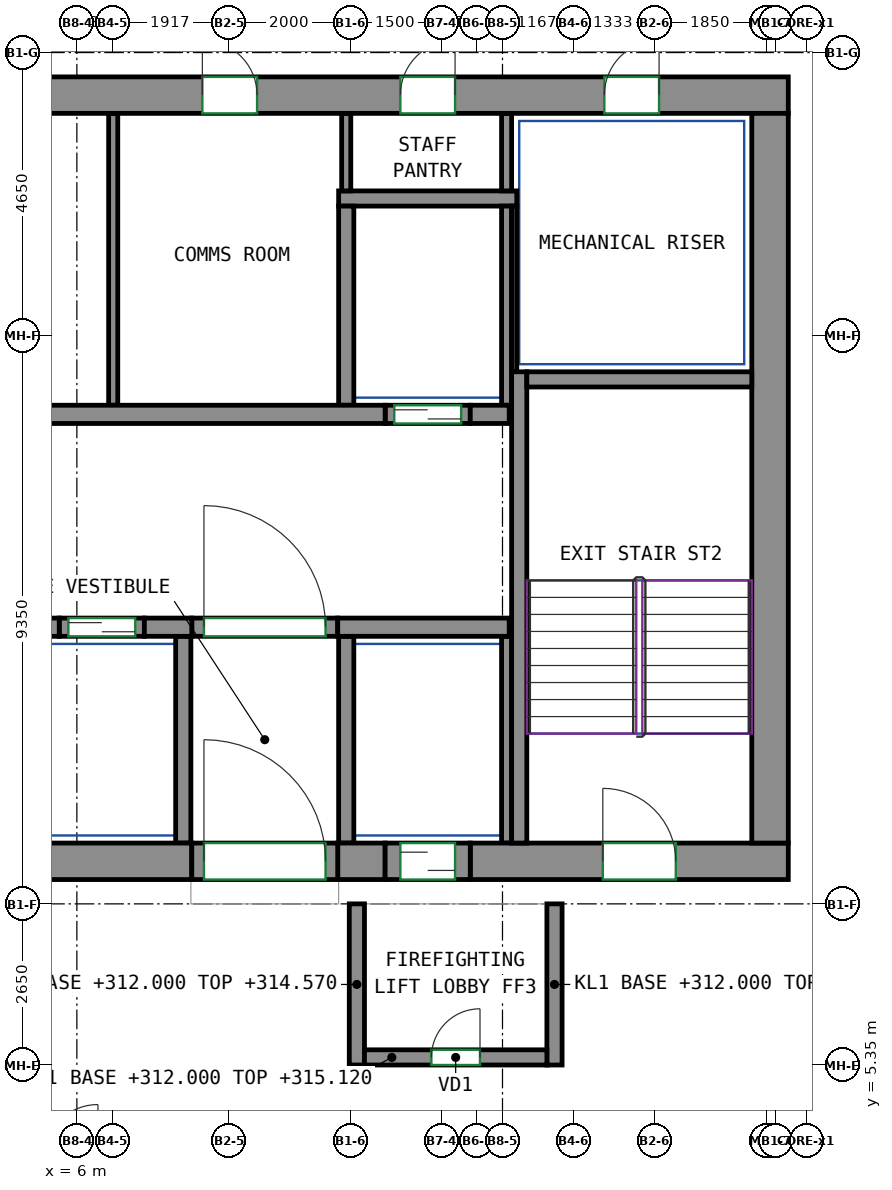
"""IFC4 building model, lengths in metres.
Left out: names, types, materials, properties, quantities, classifications, styles, units other than length and angle.
Written with IfcOpenShell. Run it as: python <this file> out.ifc"""

import sys

from ifc_helpers import new_model, si_unit, direction, frame, frame_2d, origin, place, context, subcontext, project, spatial, rectangle, extrude, source, transform, mapped, element, fill, save


model = new_model("IFC4")
c1 = context("Model", 3, precision=1e-05, world=origin(), true_north=direction((0.0, 1.0)))
c2 = subcontext(c1, "Body", "Model", "MODEL_VIEW")
j1 = project(units=[si_unit("LENGTHUNIT", "METRE"), si_unit("PLANEANGLEUNIT", "RADIAN")], contexts=[c1])
p1 = place(None, origin())
s1 = spatial("IfcSite", under=j1, at=p1, CompositionType="ELEMENT")
p2 = place(p1, origin())
s2 = spatial("IfcBuilding", under=s1, at=p2, CompositionType="ELEMENT")
p3 = place(p2, frame((0.0, 0.0, 312.0)))
s3 = spatial("IfcBuildingStorey", under=s2, at=p3, CompositionType="ELEMENT", Elevation=312.0)
m1 = source(origin(), c2, "Body", "SweptSolid", [
    extrude(rectangle(XDim=14.18, YDim=0.6, at=frame_2d((7.09, 0.0))), origin(), (0.0, 0.0, 1.0), 3.12),
])
p4 = place(p3, frame((-6.29, 8.7, 0.0), z_axis=(0.0, 0.0, 1.0), x_axis=(1.0, 0.0, 0.0)))
e1 = element("IfcWall", 1, at=p4, inside=s3, PredefinedType="SHEAR", context=c2, shape_type="MappedRepresentation", body=[
    mapped(m1, transform((0.0, 0.0, 0.0))),
])
m2 = source(origin(), c2, "Body", "SweptSolid", [
    extrude(rectangle(XDim=0.78, YDim=0.6, at=frame_2d((0.39, 0.0))), origin(), (0.0, 0.0, 1.0), 3.12),
])
p5 = place(p3, frame((10.29, 8.7, 0.0), z_axis=(0.0, 0.0, 1.0), x_axis=(1.0, 0.0, 0.0)))
e2 = element("IfcWall", 2, at=p5, inside=s3, PredefinedType="SHEAR", context=c2, shape_type="MappedRepresentation", body=[
    mapped(m2, transform((0.0, 0.0, 0.0))),
])
m3 = source(origin(), c2, "Body", "SweptSolid", [
    extrude(rectangle(XDim=5.23, YDim=0.6, at=frame_2d((2.615, 0.0))), origin(), (0.0, 0.0, 1.0), 3.12),
])
p6 = place(p3, frame((12.47, 8.7, 0.0), z_axis=(0.0, 0.0, 1.0), x_axis=(1.0, 0.0, 0.0)))
e3 = element("IfcWall", 3, at=p6, inside=s3, PredefinedType="SHEAR", context=c2, shape_type="MappedRepresentation", body=[
    mapped(m3, transform((0.0, 0.0, 0.0))),
])
p7 = place(p6, frame((2.18, 0.0, 0.0)))
e4 = element("IfcOpeningElement", 4, at=p7, cuts=e3, PredefinedType="OPENING", context=c2, shape_type="SweptSolid", body=[
    extrude(rectangle(XDim=1.2, YDim=2.1, at=frame_2d((0.6, 1.05))), frame((0.0, 0.31, 0.0), z_axis=(0.0, -1.0, 0.0), x_axis=(1.0, 0.0, 0.0)), (0.0, 0.0, 1.0), 0.62),
])
m4 = source(origin(), c2, "Body", "SweptSolid", [
    extrude(rectangle(XDim=33.3, YDim=0.6, at=frame_2d((16.65, 0.0))), origin(), (0.0, 0.0, 1.0), 3.12),
])
p8 = place(p3, frame((-15.6, 21.3, 0.0), z_axis=(0.0, 0.0, 1.0), x_axis=(1.0, 0.0, 0.0)))
e5 = element("IfcWall", 5, at=p8, inside=s3, PredefinedType="SHEAR", context=c2, shape_type="MappedRepresentation", body=[
    mapped(m4, transform((0.0, 0.0, 0.0))),
])
p9 = place(p8, frame((8.12, 0.0, 0.0)))
e6 = element("IfcOpeningElement", 6, at=p9, cuts=e5, PredefinedType="OPENING", context=c2, shape_type="SweptSolid", body=[
    extrude(rectangle(XDim=0.9, YDim=2.1, at=frame_2d((0.45, 1.05))), frame((0.0, 0.31, 0.0), z_axis=(0.0, -1.0, 0.0), x_axis=(1.0, 0.0, 0.0)), (0.0, 0.0, 1.0), 0.62),
])
p10 = place(p8, frame((14.15, 0.0, 0.0)))
e7 = element("IfcOpeningElement", 7, at=p10, cuts=e5, PredefinedType="OPENING", context=c2, shape_type="SweptSolid", body=[
    extrude(rectangle(XDim=0.9, YDim=2.1, at=frame_2d((0.45, 1.05))), frame((0.0, 0.31, 0.0), z_axis=(0.0, -1.0, 0.0), x_axis=(1.0, 0.0, 0.0)), (0.0, 0.0, 1.0), 0.62),
])
p11 = place(p8, frame((18.974, 0.0, 0.0)))
e8 = element("IfcOpeningElement", 8, at=p11, cuts=e5, PredefinedType="OPENING", context=c2, shape_type="SweptSolid", body=[
    extrude(rectangle(XDim=0.9, YDim=2.1, at=frame_2d((0.45, 1.05))), frame((0.0, 0.31, 0.0), z_axis=(0.0, -1.0, 0.0), x_axis=(1.0, 0.0, 0.0)), (0.0, 0.0, 1.0), 0.62),
])
p12 = place(p8, frame((23.664, 0.0, 0.0)))
e9 = element("IfcOpeningElement", 9, at=p12, cuts=e5, PredefinedType="OPENING", context=c2, shape_type="SweptSolid", body=[
    extrude(rectangle(XDim=0.9, YDim=2.1, at=frame_2d((0.45, 1.05))), frame((0.0, 0.31, 0.0), z_axis=(0.0, -1.0, 0.0), x_axis=(1.0, 0.0, 0.0)), (0.0, 0.0, 1.0), 0.62),
])
p13 = place(p8, frame((26.92, 0.0, 0.0)))
e10 = element("IfcOpeningElement", 10, at=p13, cuts=e5, PredefinedType="OPENING", context=c2, shape_type="SweptSolid", body=[
    extrude(rectangle(XDim=0.9, YDim=2.1, at=frame_2d((0.45, 1.05))), frame((0.0, 0.31, 0.0), z_axis=(0.0, -1.0, 0.0), x_axis=(1.0, 0.0, 0.0)), (0.0, 0.0, 1.0), 0.62),
])
p14 = place(p8, frame((2.125, 0.0, 0.0)))
e11 = element("IfcOpeningElement", 11, at=p14, cuts=e5, PredefinedType="OPENING", context=c2, shape_type="SweptSolid", body=[
    extrude(rectangle(XDim=0.9, YDim=2.1, at=frame_2d((0.45, 1.05))), frame((0.0, 0.31, 0.0), z_axis=(0.0, -1.0, 0.0), x_axis=(1.0, 0.0, 0.0)), (0.0, 0.0, 1.0), 0.62),
])
p15 = place(p8, frame((30.275, 0.0, 0.0)))
e12 = element("IfcOpeningElement", 12, at=p15, cuts=e5, PredefinedType="OPENING", context=c2, shape_type="SweptSolid", body=[
    extrude(rectangle(XDim=0.9, YDim=2.1, at=frame_2d((0.45, 1.05))), frame((0.0, 0.31, 0.0), z_axis=(0.0, -1.0, 0.0), x_axis=(1.0, 0.0, 0.0)), (0.0, 0.0, 1.0), 0.62),
])
m5 = source(origin(), c2, "Body", "SweptSolid", [
    extrude(rectangle(XDim=12.0, YDim=0.6, at=frame_2d((6.0, 0.0))), origin(), (0.0, 0.0, 1.0), 3.12),
])
p16 = place(p3, frame((17.4, 9.0, 0.0), z_axis=(0.0, 0.0, 1.0), x_axis=(0.0, 1.0, 0.0)))
e13 = element("IfcWall", 13, at=p16, inside=s3, PredefinedType="SHEAR", context=c2, shape_type="MappedRepresentation", body=[
    mapped(m5, transform((0.0, 0.0, 0.0))),
])
m6 = source(origin(), c2, "Body", "SweptSolid", [
    extrude(rectangle(XDim=7.75, YDim=0.25, at=frame_2d((3.875, 0.0))), origin(), (0.0, 0.0, 1.0), 3.12),
])
p17 = place(p3, frame((13.275, 9.0, 0.0), z_axis=(0.0, 0.0, 1.0), x_axis=(0.0, 1.0, 0.0)))
e14 = element("IfcWall", 14, at=p17, inside=s3, PredefinedType="SHEAR", context=c2, shape_type="MappedRepresentation", body=[
    mapped(m6, transform((0.0, 0.0, 0.0))),
])
m7 = source(origin(), c2, "Body", "SweptSolid", [
    extrude(rectangle(XDim=3.7, YDim=0.25, at=frame_2d((1.85, 0.0))), origin(), (0.0, 0.0, 1.0), 3.12),
])
p18 = place(p3, frame((13.4, 16.625, 0.0), z_axis=(0.0, 0.0, 1.0), x_axis=(1.0, 0.0, 0.0)))
e15 = element("IfcWall", 15, at=p18, inside=s3, PredefinedType="SHEAR", context=c2, shape_type="MappedRepresentation", body=[
    mapped(m7, transform((0.0, 0.0, 0.0))),
])
m8 = source(origin(), c2, "Body", "SweptSolid", [
    extrude(rectangle(XDim=1.28, YDim=0.3, at=frame_2d((0.64, 0.0))), origin(), (0.0, 0.0, 1.0), 3.12),
])
p19 = place(p3, frame((4.43, 12.55, 0.0), z_axis=(0.0, 0.0, 1.0), x_axis=(1.0, 0.0, 0.0)))
e16 = element("IfcWall", 16, at=p19, inside=s3, PredefinedType="SHEAR", context=c2, shape_type="MappedRepresentation", body=[
    mapped(m8, transform((0.0, 0.0, 0.0))),
])
m9 = source(origin(), c2, "Body", "SweptSolid", [
    extrude(rectangle(XDim=0.78, YDim=0.3, at=frame_2d((0.39, 0.0))), origin(), (0.0, 0.0, 1.0), 3.12),
])
p20 = place(p3, frame((7.11, 12.55, 0.0), z_axis=(0.0, 0.0, 1.0), x_axis=(1.0, 0.0, 0.0)))
e17 = element("IfcWall", 17, at=p20, inside=s3, PredefinedType="SHEAR", context=c2, shape_type="MappedRepresentation", body=[
    mapped(m9, transform((0.0, 0.0, 0.0))),
])
m10 = source(origin(), c2, "Body", "SweptSolid", [
    extrude(rectangle(XDim=2.82, YDim=0.3, at=frame_2d((1.41, 0.0))), origin(), (0.0, 0.0, 1.0), 3.12),
])
p21 = place(p3, frame((10.29, 12.55, 0.0), z_axis=(0.0, 0.0, 1.0), x_axis=(1.0, 0.0, 0.0)))
e18 = element("IfcWall", 18, at=p21, inside=s3, PredefinedType="SHEAR", context=c2, shape_type="MappedRepresentation", body=[
    mapped(m10, transform((0.0, 0.0, 0.0))),
])
m11 = source(origin(), c2, "Body", "SweptSolid", [
    extrude(rectangle(XDim=22.08, YDim=0.3, at=frame_2d((11.04, 0.0))), origin(), (0.0, 0.0, 1.0), 3.12),
])
p22 = place(p3, frame((-11.01, 16.05, 0.0), z_axis=(0.0, 0.0, 1.0), x_axis=(1.0, 0.0, 0.0)))
e19 = element("IfcWall", 19, at=p22, inside=s3, PredefinedType="SHEAR", context=c2, shape_type="MappedRepresentation", body=[
    mapped(m11, transform((0.0, 0.0, 0.0))),
])
m12 = source(origin(), c2, "Body", "SweptSolid", [
    extrude(rectangle(XDim=0.64, YDim=0.3, at=frame_2d((0.32, 0.0))), origin(), (0.0, 0.0, 1.0), 3.12),
])
p23 = place(p3, frame((12.47, 16.05, 0.0), z_axis=(0.0, 0.0, 1.0), x_axis=(1.0, 0.0, 0.0)))
e20 = element("IfcWall", 20, at=p23, inside=s3, PredefinedType="SHEAR", context=c2, shape_type="MappedRepresentation", body=[
    mapped(m12, transform((0.0, 0.0, 0.0))),
])
m13 = source(origin(), c2, "Body", "SweptSolid", [
    extrude(rectangle(XDim=1.4, YDim=0.3, at=frame_2d((0.7, 0.0))), origin(), (0.0, 0.0, 1.0), 3.12),
])
p24 = place(p3, frame((5.71, 12.55, 0.0), z_axis=(0.0, 0.0, 1.0), x_axis=(1.0, 0.0, 0.0)))
e21 = element("IfcWall", 21, at=p24, inside=s3, PredefinedType="PARTITIONING", context=c2, shape_type="MappedRepresentation", body=[
    mapped(m13, transform((0.0, 0.0, 0.0))),
])
p25 = place(p24, frame((0.15, 0.0, 0.0)))
e22 = element("IfcOpeningElement", 22, at=p25, cuts=e21, PredefinedType="OPENING", context=c2, shape_type="SweptSolid", body=[
    extrude(rectangle(XDim=1.1, YDim=2.1, at=frame_2d((0.55, 1.05))), frame((0.0, 0.16, 0.0), z_axis=(0.0, -1.0, 0.0), x_axis=(1.0, 0.0, 0.0)), (0.0, 0.0, 1.0), 0.32),
])
m14 = source(origin(), c2, "Body", "SweptSolid", [
    extrude(rectangle(XDim=1.4, YDim=0.3, at=frame_2d((0.7, 0.0))), origin(), (0.0, 0.0, 1.0), 3.12),
])
p26 = place(p3, frame((11.07, 16.05, 0.0), z_axis=(0.0, 0.0, 1.0), x_axis=(1.0, 0.0, 0.0)))
e23 = element("IfcWall", 23, at=p26, inside=s3, PredefinedType="PARTITIONING", context=c2, shape_type="MappedRepresentation", body=[
    mapped(m14, transform((0.0, 0.0, 0.0))),
])
p27 = place(p26, frame((0.15, 0.0, 0.0)))
e24 = element("IfcOpeningElement", 24, at=p27, cuts=e23, PredefinedType="OPENING", context=c2, shape_type="SweptSolid", body=[
    extrude(rectangle(XDim=1.1, YDim=2.1, at=frame_2d((0.55, 1.05))), frame((0.0, 0.16, 0.0), z_axis=(0.0, -1.0, 0.0), x_axis=(1.0, 0.0, 0.0)), (0.0, 0.0, 1.0), 0.32),
])
m15 = source(origin(), c2, "Body", "SweptSolid", [
    extrude(rectangle(XDim=2.4, YDim=0.3, at=frame_2d((1.2, 0.0))), origin(), (0.0, 0.0, 1.0), 3.12),
])
p28 = place(p3, frame((7.89, 12.55, 0.0), z_axis=(0.0, 0.0, 1.0), x_axis=(1.0, 0.0, 0.0)))
e25 = element("IfcWall", 25, at=p28, inside=s3, PredefinedType="PARTITIONING", context=c2, shape_type="MappedRepresentation", body=[
    mapped(m15, transform((0.0, 0.0, 0.0))),
])
p29 = place(p28, frame((0.2, 0.0, 0.0)))
e26 = element("IfcOpeningElement", 26, at=p29, cuts=e25, PredefinedType="OPENING", context=c2, shape_type="SweptSolid", body=[
    extrude(rectangle(XDim=2.0, YDim=2.1, at=frame_2d((1.0, 1.05))), frame((0.0, 0.16, 0.0), z_axis=(0.0, -1.0, 0.0), x_axis=(1.0, 0.0, 0.0)), (0.0, 0.0, 1.0), 0.32),
])
m16 = source(origin(), c2, "Body", "SweptSolid", [
    extrude(rectangle(XDim=2.65, YDim=0.25, at=frame_2d((1.325, 0.0))), origin(), (0.0, 0.0, 1.0), 2.57),
])
for number, where, z_axis, x_axis in (
    (27, (10.605, 5.35, 0.0), (0.0, 0.0, 1.0), (0.0, 1.0, 0.0)),
    (28, (13.855, 5.35, 0.0), (0.0, 0.0, 1.0), (0.0, 1.0, 0.0)),
):
    element("IfcWall", number, at=place(p3, frame(where, z_axis=z_axis, x_axis=x_axis)), inside=s3, PredefinedType="PARTITIONING", context=c2, shape_type="MappedRepresentation", body=[
        mapped(m16, transform((0.0, 0.0, 0.0))),
    ])
m17 = source(origin(), c2, "Body", "SweptSolid", [
    extrude(rectangle(XDim=3.0, YDim=0.25, at=frame_2d((1.5, 0.0))), origin(), (0.0, 0.0, 1.0), 3.12),
])
p30 = place(p3, frame((10.73, 5.475, 0.0), z_axis=(0.0, 0.0, 1.0), x_axis=(1.0, 0.0, 0.0)))
e29 = element("IfcWall", 29, at=p30, inside=s3, PredefinedType="PARTITIONING", context=c2, shape_type="MappedRepresentation", body=[
    mapped(m17, transform((0.0, 0.0, 0.0))),
])
p31 = place(p30, frame((1.1, 0.0, 0.0)))
e30 = element("IfcOpeningElement", 30, at=p31, cuts=e29, PredefinedType="OPENING", context=c2, shape_type="SweptSolid", body=[
    extrude(rectangle(XDim=0.8, YDim=2.0, at=frame_2d((0.4, 1.0))), frame((0.0, 0.135, 0.0), z_axis=(0.0, -1.0, 0.0), x_axis=(1.0, 0.0, 0.0)), (0.0, 0.0, 1.0), 0.27),
])
m18 = source(origin(), c2, "Body", "SweptSolid", [
    extrude(rectangle(XDim=2.93, YDim=0.25, at=frame_2d((1.465, 0.0))), origin(), (0.0, 0.0, 1.0), 3.12),
])
p32 = place(p3, frame((10.305, 19.6, 0.0), z_axis=(0.0, 0.0, 1.0), x_axis=(1.0, 0.0, 0.0)))
e31 = element("IfcWall", 31, at=p32, inside=s3, PredefinedType="PARTITIONING", context=c2, shape_type="MappedRepresentation", body=[
    mapped(m18, transform((0.0, 0.0, 0.0))),
])
m19 = source(origin(), c2, "Body", "SweptSolid", [
    extrude(rectangle(XDim=3.275, YDim=0.165, at=frame_2d((1.638, 0.0))), origin(), (0.0, 0.0, 1.0), 3.12),
])
p33 = place(p3, frame((13.067, 16.2, 0.0), z_axis=(0.0, 0.0, 1.0), x_axis=(0.0, 1.0, 0.0)))
e32 = element("IfcWall", 32, at=p33, inside=s3, PredefinedType="PARTITIONING", context=c2, shape_type="MappedRepresentation", body=[
    mapped(m19, transform((0.0, 0.0, 0.0))),
])
m20 = source(origin(), c2, "Body", "SweptSolid", [
    extrude(rectangle(XDim=1.275, YDim=0.165, at=frame_2d((0.637, 0.0))), origin(), (0.0, 0.0, 1.0), 3.12),
])
p34 = place(p3, frame((13.067, 19.725, 0.0), z_axis=(0.0, 0.0, 1.0), x_axis=(0.0, 1.0, 0.0)))
e33 = element("IfcWall", 33, at=p34, inside=s3, PredefinedType="PARTITIONING", context=c2, shape_type="MappedRepresentation", body=[
    mapped(m20, transform((0.0, 0.0, 0.0))),
])
m21 = source(origin(), c2, "Body", "SweptSolid", [
    extrude(rectangle(XDim=3.275, YDim=0.25, at=frame_2d((1.638, 0.0))), origin(), (0.0, 0.0, 1.0), 3.12),
])
p35 = place(p3, frame((10.43, 16.2, 0.0), z_axis=(0.0, 0.0, 1.0), x_axis=(0.0, 1.0, 0.0)))
e34 = element("IfcWall", 34, at=p35, inside=s3, PredefinedType="PARTITIONING", context=c2, shape_type="MappedRepresentation", body=[
    mapped(m21, transform((0.0, 0.0, 0.0))),
])
m22 = source(origin(), c2, "Body", "SweptSolid", [
    extrude(rectangle(XDim=2.725, YDim=0.085, at=frame_2d((1.363, 0.0))), origin(), (0.0, 0.0, 1.0), 3.12),
])
p36 = place(p3, frame((13.192, 16.75, 0.0), z_axis=(0.0, 0.0, 1.0), x_axis=(0.0, 1.0, 0.0)))
e35 = element("IfcWall", 35, at=p36, inside=s3, PredefinedType="PARTITIONING", context=c2, shape_type="MappedRepresentation", body=[
    mapped(m22, transform((0.0, 0.0, 0.0))),
])
m23 = source(origin(), c2, "Body", "SweptSolid", [
    extrude(rectangle(XDim=3.4, YDim=0.25, at=frame_2d((1.7, 0.0))), origin(), (0.0, 0.0, 1.0), 3.12),
])
p37 = place(p3, frame((10.43, 9.0, 0.0), z_axis=(0.0, 0.0, 1.0), x_axis=(0.0, 1.0, 0.0)))
e36 = element("IfcWall", 36, at=p37, inside=s3, PredefinedType="PARTITIONING", context=c2, shape_type="MappedRepresentation", body=[
    mapped(m23, transform((0.0, 0.0, 0.0))),
])
m24 = source(origin(), c2, "Body", "SweptSolid", [
    extrude(rectangle(XDim=3.4, YDim=0.165, at=frame_2d((1.7, 0.0))), origin(), (0.0, 0.0, 1.0), 3.12),
])
p38 = place(p3, frame((13.067, 9.0, 0.0), z_axis=(0.0, 0.0, 1.0), x_axis=(0.0, 1.0, 0.0)))
e37 = element("IfcWall", 37, at=p38, inside=s3, PredefinedType="PARTITIONING", context=c2, shape_type="MappedRepresentation", body=[
    mapped(m24, transform((0.0, 0.0, 0.0))),
])
p39 = place(p3, frame((7.75, 9.0, 0.0), z_axis=(0.0, 0.0, 1.0), x_axis=(0.0, 1.0, 0.0)))
e38 = element("IfcWall", 38, at=p39, inside=s3, PredefinedType="PARTITIONING", context=c2, shape_type="MappedRepresentation", body=[
    mapped(m23, transform((0.0, 0.0, 0.0))),
])
m25 = source(origin(), c2, "Body", "SweptSolid", [
    extrude(rectangle(XDim=4.8, YDim=0.15, at=frame_2d((2.4, 0.0))), origin(), (0.0, 0.0, 1.0), 3.12),
])
p40 = place(p3, frame((6.598, 16.2, 0.0), z_axis=(0.0, 0.0, 1.0), x_axis=(0.0, 1.0, 0.0)))
e39 = element("IfcWall", 39, at=p40, inside=s3, PredefinedType="PARTITIONING", context=c2, shape_type="MappedRepresentation", body=[
    mapped(m25, transform((0.0, 0.0, 0.0))),
])
m26 = source(origin(), c2, "Body", "SweptSolid", [
    extrude(rectangle(XDim=1.275, YDim=0.15, at=frame_2d((0.637, 0.0))), origin(), (0.0, 0.0, 1.0), 3.12),
])
p41 = place(p3, frame((10.43, 19.725, 0.0), z_axis=(0.0, 0.0, 1.0), x_axis=(0.0, 1.0, 0.0)))
e40 = element("IfcWall", 40, at=p41, inside=s3, PredefinedType="PARTITIONING", context=c2, shape_type="MappedRepresentation", body=[
    mapped(m26, transform((0.0, 0.0, 0.0))),
])
m27 = source(origin(), c2, "Body", "SweptSolid", [
    extrude(rectangle(XDim=2.4, YDim=0.6, at=frame_2d((1.2, 0.0))), origin(), (0.0, 0.0, 1.0), 2.7),
])
p42 = place(p3, frame((7.89, 8.7, 0.0), z_axis=(0.0, 0.0, 1.0), x_axis=(1.0, 0.0, 0.0)))
e41 = element("IfcWall", 41, at=p42, inside=s3, PredefinedType="PARTITIONING", context=c2, shape_type="MappedRepresentation", body=[
    mapped(m27, transform((0.0, 0.0, 0.0))),
])
p43 = place(p42, frame((0.2, 0.0, 0.0)))
e42 = element("IfcOpeningElement", 42, at=p43, cuts=e41, PredefinedType="OPENING", context=c2, shape_type="SweptSolid", body=[
    extrude(rectangle(XDim=2.0, YDim=2.1, at=frame_2d((1.0, 1.05))), frame((0.0, 0.31, 0.0), z_axis=(0.0, -1.0, 0.0), x_axis=(1.0, 0.0, 0.0)), (0.0, 0.0, 1.0), 0.62),
])
m28 = source(origin(), c2, "Body", "SweptSolid", [
    extrude(rectangle(XDim=1.4, YDim=0.6, at=frame_2d((0.7, 0.0))), origin(), (0.0, 0.0, 1.0), 2.7),
])
p44 = place(p3, frame((11.07, 8.7, 0.0), z_axis=(0.0, 0.0, 1.0), x_axis=(1.0, 0.0, 0.0)))
e43 = element("IfcWall", 43, at=p44, inside=s3, PredefinedType="PARTITIONING", context=c2, shape_type="MappedRepresentation", body=[
    mapped(m28, transform((0.0, 0.0, 0.0))),
])
p45 = place(p44, frame((0.25, 0.0, 0.0)))
e44 = element("IfcOpeningElement", 44, at=p45, cuts=e43, PredefinedType="OPENING", context=c2, shape_type="SweptSolid", body=[
    extrude(rectangle(XDim=0.9, YDim=2.1, at=frame_2d((0.45, 1.05))), frame((0.0, 0.31, 0.0), z_axis=(0.0, -1.0, 0.0), x_axis=(1.0, 0.0, 0.0)), (0.0, 0.0, 1.0), 0.62),
])
p46 = place(p29, origin())
e45 = element("IfcDoor", 45, at=p46, inside=s3, OperationType="DOUBLE_DOOR_SINGLE_SWING", PredefinedType="DOOR", context=c2, shape_type="SweptSolid", body=[
    extrude(rectangle(XDim=2.0, YDim=2.1, at=frame_2d((1.0, 1.05))), frame((0.0, 0.025, 0.0), z_axis=(0.0, -1.0, 0.0), x_axis=(1.0, 0.0, 0.0)), (0.0, 0.0, 1.0), 0.05),
])
fill(e26, e45)
p47 = place(p43, origin())
e46 = element("IfcDoor", 46, at=p47, inside=s3, OperationType="DOUBLE_DOOR_SINGLE_SWING", PredefinedType="DOOR", context=c2, shape_type="SweptSolid", body=[
    extrude(rectangle(XDim=2.0, YDim=2.1, at=frame_2d((1.0, 1.05))), frame((0.0, 0.205, 0.0), z_axis=(0.0, -1.0, 0.0), x_axis=(1.0, 0.0, 0.0)), (0.0, 0.0, 1.0), 0.05),
])
fill(e42, e46)
p48 = place(p31, origin())
e47 = element("IfcDoor", 47, at=p48, inside=s3, OperationType="SINGLE_SWING_RIGHT", PredefinedType="DOOR", context=c2, shape_type="SweptSolid", body=[
    extrude(rectangle(XDim=0.8, YDim=2.0, at=frame_2d((0.4, 1.0))), frame((0.0, 0.025, 0.0), z_axis=(0.0, -1.0, 0.0), x_axis=(1.0, 0.0, 0.0)), (0.0, 0.0, 1.0), 0.05),
])
fill(e30, e47)
p49 = place(p45, origin())
e48 = element("IfcDoor", 48, at=p49, inside=s3, OperationType="SLIDING_TO_LEFT", PredefinedType="DOOR", context=c2, shape_type="SweptSolid", body=[
    extrude(rectangle(XDim=0.9, YDim=2.1, at=frame_2d((0.45, 1.05))), frame((0.0, 0.205, 0.0), z_axis=(0.0, -1.0, 0.0), x_axis=(1.0, 0.0, 0.0)), (0.0, 0.0, 1.0), 0.05),
])
fill(e44, e48)
p50 = place(p25, origin())
e49 = element("IfcDoor", 49, at=p50, inside=s3, OperationType="DOUBLE_DOOR_SLIDING", PredefinedType="DOOR", context=c2, shape_type="SweptSolid", body=[
    extrude(rectangle(XDim=1.1, YDim=2.1, at=frame_2d((0.55, 1.05))), frame((0.0, 0.025, 0.0), z_axis=(0.0, -1.0, 0.0), x_axis=(1.0, 0.0, 0.0)), (0.0, 0.0, 1.0), 0.05),
])
fill(e22, e49)
p51 = place(p27, origin())
e50 = element("IfcDoor", 50, at=p51, inside=s3, OperationType="DOUBLE_DOOR_SLIDING", PredefinedType="DOOR", context=c2, shape_type="SweptSolid", body=[
    extrude(rectangle(XDim=1.1, YDim=2.1, at=frame_2d((0.55, 1.05))), frame((0.0, 0.025, 0.0), z_axis=(0.0, -1.0, 0.0), x_axis=(1.0, 0.0, 0.0)), (0.0, 0.0, 1.0), 0.05),
])
fill(e24, e50)
p52 = place(p12, origin())
e51 = element("IfcDoor", 51, at=p52, inside=s3, OperationType="SINGLE_SWING_LEFT", PredefinedType="DOOR", context=c2, shape_type="SweptSolid", body=[
    extrude(rectangle(XDim=0.9, YDim=2.1, at=frame_2d((0.45, 1.05))), frame((0.0, -0.155, 0.0), z_axis=(0.0, -1.0, 0.0), x_axis=(1.0, 0.0, 0.0)), (0.0, 0.0, 1.0), 0.05),
])
fill(e9, e51)
p53 = place(p13, origin())
e52 = element("IfcDoor", 52, at=p53, inside=s3, OperationType="SINGLE_SWING_RIGHT", PredefinedType="DOOR", context=c2, shape_type="SweptSolid", body=[
    extrude(rectangle(XDim=0.9, YDim=2.1, at=frame_2d((0.45, 1.05))), frame((0.0, -0.155, 0.0), z_axis=(0.0, -1.0, 0.0), x_axis=(1.0, 0.0, 0.0)), (0.0, 0.0, 1.0), 0.05),
])
fill(e10, e52)
p54 = place(p15, origin())
e53 = element("IfcDoor", 53, at=p54, inside=s3, OperationType="SINGLE_SWING_RIGHT", PredefinedType="DOOR", context=c2, shape_type="SweptSolid", body=[
    extrude(rectangle(XDim=0.9, YDim=2.1, at=frame_2d((0.45, 1.05))), frame((0.0, -0.155, 0.0), z_axis=(0.0, -1.0, 0.0), x_axis=(1.0, 0.0, 0.0)), (0.0, 0.0, 1.0), 0.05),
])
fill(e12, e53)
p55 = place(p7, origin())
e54 = element("IfcDoor", 54, at=p55, inside=s3, OperationType="DOUBLE_DOOR_SINGLE_SWING", PredefinedType="DOOR", context=c2, shape_type="SweptSolid", body=[
    extrude(rectangle(XDim=1.2, YDim=2.1, at=frame_2d((0.6, 1.05))), frame((0.0, 0.205, 0.0), z_axis=(0.0, -1.0, 0.0), x_axis=(1.0, 0.0, 0.0)), (0.0, 0.0, 1.0), 0.05),
])
fill(e4, e54)
save(model, sys.argv[1])
